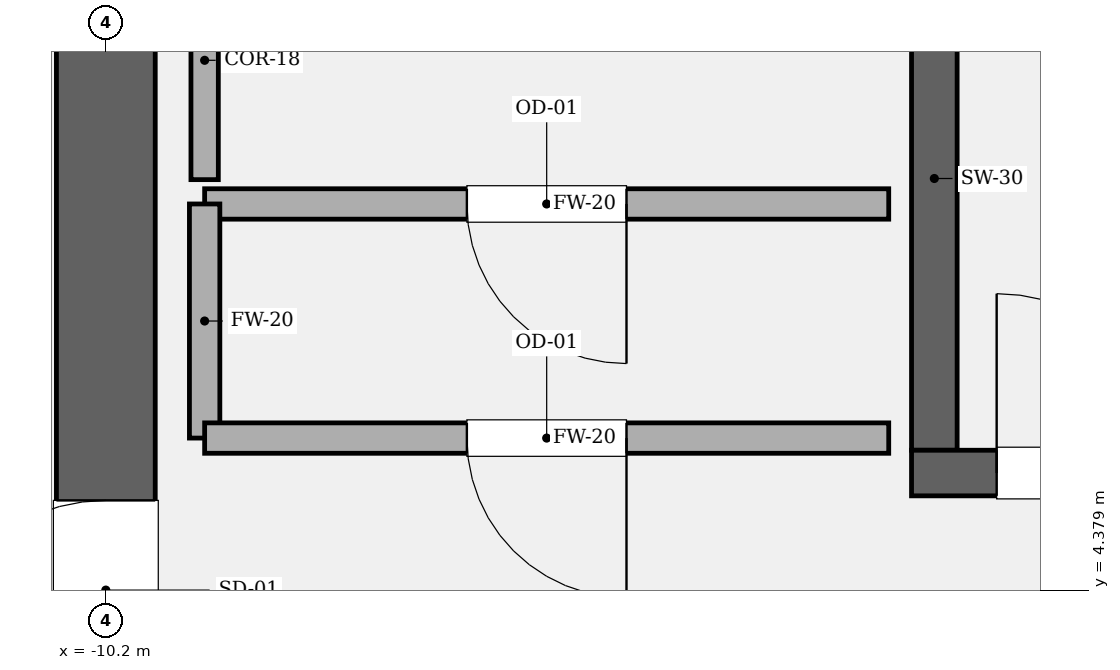
"""IFC4 building model, lengths in metres.
Left out: names, types, materials, properties, quantities, classifications, styles, units other than length and angle.
Written with IfcOpenShell. Run it as: python <this file> out.ifc"""

import sys

from ifc_helpers import new_model, si_unit, direction, frame, frame_2d, origin, place, context, subcontext, project, spatial, rectangle, extrude, element, fill, save


model = new_model("IFC4")
c1 = context("Model", 3, precision=1e-05, world=origin(), true_north=direction((0.0, 1.0)))
c2 = subcontext(c1, "Body", "Model", "MODEL_VIEW")
j1 = project(units=[si_unit("LENGTHUNIT", "METRE"), si_unit("PLANEANGLEUNIT", "RADIAN")], contexts=[c1])
p1 = place(None, origin())
s1 = spatial("IfcSite", under=j1, at=p1, CompositionType="ELEMENT")
p2 = place(p1, origin())
s2 = spatial("IfcBuilding", under=s1, at=p2, CompositionType="ELEMENT")
p3 = place(p2, frame((0.0, 0.0, 164.1)))
s3 = spatial("IfcBuildingStorey", under=s2, at=p3, CompositionType="ELEMENT", Elevation=164.1)
p4 = place(p3, frame((-10.2, -8.875, 0.0), z_axis=(0.0, 0.0, 1.0), x_axis=(0.0, 1.0, 0.0)))
e1 = element("IfcWall", 1, at=p4, inside=s3, PredefinedType="SHEAR", context=c2, shape_type="SweptSolid", body=[
    extrude(rectangle(XDim=17.75, YDim=0.65, at=frame_2d((8.875, 0.0))), origin(), (0.0, 0.0, 1.0), 4.05),
])
p5 = place(p4, frame((12.665, 0.0, 0.0)))
e2 = element("IfcOpeningElement", 2, at=p5, cuts=e1, PredefinedType="OPENING", context=c2, shape_type="SweptSolid", body=[
    extrude(rectangle(XDim=1.18, YDim=2.2, at=frame_2d((0.59, 1.1))), frame((0.0, 0.335, 0.0), z_axis=(0.0, -1.0, 0.0), x_axis=(1.0, 0.0, 0.0)), (0.0, 0.0, 1.0), 0.67),
])
p6 = place(p3, frame((-4.75, 5.3, 0.0), z_axis=(0.0, 0.0, 1.0), x_axis=(0.0, 1.0, 0.0)))
e3 = element("IfcWall", 3, at=p6, inside=s3, PredefinedType="SOLIDWALL", context=c2, shape_type="SweptSolid", body=[
    extrude(rectangle(XDim=3.575, YDim=0.3, at=frame_2d((1.788, 0.0))), origin(), (0.0, 0.0, 1.0), 4.05),
])
p7 = place(p3, frame((-4.9, 5.15, 0.0), z_axis=(0.0, 0.0, 1.0), x_axis=(1.0, 0.0, 0.0)))
e4 = element("IfcWall", 4, at=p7, inside=s3, PredefinedType="SOLIDWALL", context=c2, shape_type="SweptSolid", body=[
    extrude(rectangle(XDim=9.8, YDim=0.3, at=frame_2d((4.9, 0.0))), origin(), (0.0, 0.0, 1.0), 4.05),
])
p8 = place(p7, frame((0.56, 0.0, 0.0)))
e5 = element("IfcOpeningElement", 5, at=p8, cuts=e4, PredefinedType="OPENING", context=c2, shape_type="SweptSolid", body=[
    extrude(rectangle(XDim=1.18, YDim=2.2, at=frame_2d((0.59, 1.1))), frame((0.0, 0.16, 0.0), z_axis=(0.0, -1.0, 0.0), x_axis=(1.0, 0.0, 0.0)), (0.0, 0.0, 1.0), 0.32),
])
p9 = place(p3, frame((-5.05, 6.92, 0.0), z_axis=(0.0, 0.0, 1.0), x_axis=(-1.0, 0.0, 0.0)))
e6 = element("IfcWall", 6, at=p9, inside=s3, PredefinedType="SOLIDWALL", context=c2, shape_type="SweptSolid", body=[
    extrude(rectangle(XDim=4.5, YDim=0.2, at=frame_2d((2.25, 0.0))), origin(), (0.0, 0.0, 1.0), 3.83),
])
p10 = place(p9, frame((1.725, 0.0, 0.0)))
e7 = element("IfcOpeningElement", 7, at=p10, cuts=e6, PredefinedType="OPENING", context=c2, shape_type="SweptSolid", body=[
    extrude(rectangle(XDim=1.05, YDim=2.2, at=frame_2d((0.525, 1.1))), frame((0.0, 0.11, 0.0), z_axis=(0.0, -1.0, 0.0), x_axis=(1.0, 0.0, 0.0)), (0.0, 0.0, 1.0), 0.22),
])
p11 = place(p3, frame((-9.55, 6.92, 0.0), z_axis=(0.0, 0.0, 1.0), x_axis=(0.0, -1.0, 0.0)))
e8 = element("IfcWall", 8, at=p11, inside=s3, PredefinedType="SOLIDWALL", context=c2, shape_type="SweptSolid", body=[
    extrude(rectangle(XDim=1.54, YDim=0.2, at=frame_2d((0.77, 0.0))), origin(), (0.0, 0.0, 1.0), 3.83),
])
p12 = place(p3, frame((-9.55, 5.38, 0.0), z_axis=(0.0, 0.0, 1.0), x_axis=(1.0, 0.0, 0.0)))
e9 = element("IfcWall", 9, at=p12, inside=s3, PredefinedType="SOLIDWALL", context=c2, shape_type="SweptSolid", body=[
    extrude(rectangle(XDim=4.5, YDim=0.2, at=frame_2d((2.25, 0.0))), origin(), (0.0, 0.0, 1.0), 3.83),
])
p13 = place(p12, frame((1.725, 0.0, 0.0)))
e10 = element("IfcOpeningElement", 10, at=p13, cuts=e9, PredefinedType="OPENING", context=c2, shape_type="SweptSolid", body=[
    extrude(rectangle(XDim=1.05, YDim=2.2, at=frame_2d((0.525, 1.1))), frame((0.0, 0.11, 0.0), z_axis=(0.0, -1.0, 0.0), x_axis=(1.0, 0.0, 0.0)), (0.0, 0.0, 1.0), 0.22),
])
p14 = place(p3, frame((-9.55, 8.65, 0.0), z_axis=(0.0, 0.0, 1.0), x_axis=(0.0, -1.0, 0.0)))
e11 = element("IfcWall", 11, at=p14, inside=s3, PredefinedType="PARTITIONING", context=c2, shape_type="SweptSolid", body=[
    extrude(rectangle(XDim=1.57, YDim=0.18, at=frame_2d((0.785, 0.0))), origin(), (0.0, 0.0, 1.0), 3.83),
])
p15 = place(p8, origin())
e12 = element("IfcDoor", 12, at=p15, inside=s3, OperationType="SINGLE_SWING_LEFT", PredefinedType="DOOR", context=c2, shape_type="SweptSolid", body=[
    extrude(rectangle(XDim=1.18, YDim=2.2, at=frame_2d((0.59, 1.1))), frame((0.0, 0.025, 0.0), z_axis=(0.0, -1.0, 0.0), x_axis=(1.0, 0.0, 0.0)), (0.0, 0.0, 1.0), 0.05),
])
fill(e5, e12)
p16 = place(p5, origin())
e13 = element("IfcDoor", 13, at=p16, inside=s3, OperationType="SINGLE_SWING_LEFT", PredefinedType="DOOR", context=c2, shape_type="SweptSolid", body=[
    extrude(rectangle(XDim=1.18, YDim=2.2, at=frame_2d((0.59, 1.1))), frame((0.0, 0.025, 0.0), z_axis=(0.0, -1.0, 0.0), x_axis=(1.0, 0.0, 0.0)), (0.0, 0.0, 1.0), 0.05),
])
fill(e2, e13)
p17 = place(p13, origin())
e14 = element("IfcDoor", 14, at=p17, inside=s3, OperationType="SINGLE_SWING_RIGHT", PredefinedType="DOOR", context=c2, shape_type="SweptSolid", body=[
    extrude(rectangle(XDim=1.05, YDim=2.2, at=frame_2d((0.525, 1.1))), frame((0.0, 0.025, 0.0), z_axis=(0.0, -1.0, 0.0), x_axis=(1.0, 0.0, 0.0)), (0.0, 0.0, 1.0), 0.05),
])
fill(e10, e14)
p18 = place(p10, origin())
e15 = element("IfcDoor", 15, at=p18, inside=s3, OperationType="SINGLE_SWING_LEFT", PredefinedType="DOOR", context=c2, shape_type="SweptSolid", body=[
    extrude(rectangle(XDim=1.05, YDim=2.2, at=frame_2d((0.525, 1.1))), frame((0.0, 0.025, 0.0), z_axis=(0.0, -1.0, 0.0), x_axis=(1.0, 0.0, 0.0)), (0.0, 0.0, 1.0), 0.05),
])
fill(e7, e15)
save(model, sys.argv[1])
